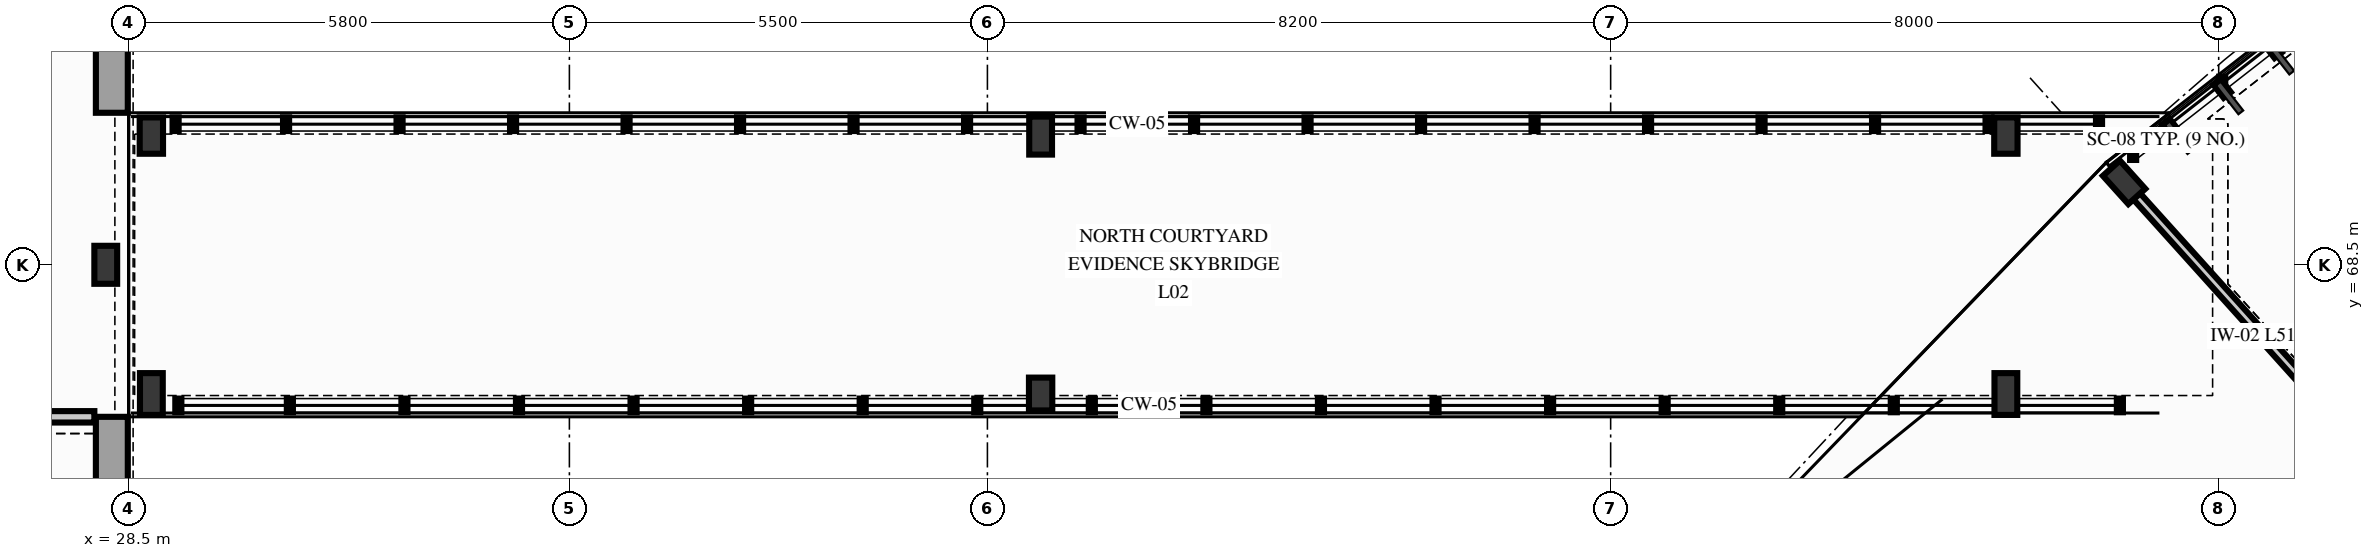
"""IFC4 building model, lengths in metres.
Left out: names, types, materials, properties, quantities, classifications, styles, units other than length and angle.
Written with IfcOpenShell. Run it as: python <this file> out.ifc"""

import sys

from ifc_helpers import new_model, si_unit, direction, frame, frame_2d, origin, origin_2d, place, context, subcontext, project, spatial, rectangle, i_section, extrude, element, save


model = new_model("IFC4")
c1 = context("Model", 3, precision=1e-05, world=origin(), true_north=direction((0.0, 1.0)))
c2 = subcontext(c1, "Body", "Model", "MODEL_VIEW")
j1 = project(units=[si_unit("LENGTHUNIT", "METRE"), si_unit("PLANEANGLEUNIT", "RADIAN")], contexts=[c1])
p1 = place(None, origin())
s1 = spatial("IfcSite", under=j1, at=p1, CompositionType="ELEMENT")
p2 = place(p1, origin())
s2 = spatial("IfcBuilding", under=s1, at=p2, CompositionType="ELEMENT")
p3 = place(p2, frame((0.0, 0.0, 9.3)))
s3 = spatial("IfcBuildingStorey", under=s2, at=p3, CompositionType="ELEMENT", Elevation=9.3)
p4 = place(p3, frame((54.756, 69.585, 0.0), z_axis=(0.0, 0.0, 1.0), x_axis=(0.743144825477, 0.669130606359, 0.0)))
e1 = element("IfcColumn", 1, at=p4, inside=s3, PredefinedType="COLUMN", context=c2, shape_type="SweptSolid", body=[
    extrude(i_section(OverallWidth=0.3, OverallDepth=0.5, WebThickness=0.014, FlangeThickness=0.028, FilletRadius=0.027, at=origin_2d()), origin(), (0.0, 0.0, 1.0), 4.2),
])
p5 = place(p3, frame((53.2, 70.2, 0.0), z_axis=(0.0, 0.0, 1.0), x_axis=(1.0, 0.0, 0.0)))
e2 = element("IfcColumn", 2, at=p5, inside=s3, PredefinedType="COLUMN", context=c2, shape_type="SweptSolid", body=[
    extrude(i_section(OverallWidth=0.307, OverallDepth=0.478, WebThickness=0.021, FlangeThickness=0.04, FilletRadius=0.027, at=origin_2d()), origin(), (0.0, 0.0, 1.0), 3.94),
])
p6 = place(p3, frame((53.2, 66.8, 0.0), z_axis=(0.0, 0.0, 1.0), x_axis=(1.0, 0.0, 0.0)))
e3 = element("IfcColumn", 3, at=p6, inside=s3, PredefinedType="COLUMN", context=c2, shape_type="SweptSolid", body=[
    extrude(i_section(OverallWidth=0.3, OverallDepth=0.55, WebThickness=0.015, FlangeThickness=0.029, FilletRadius=0.027, at=origin_2d()), origin(), (0.0, 0.0, 1.0), 3.94),
])
p7 = place(p3, frame((40.5, 70.2, 0.0), z_axis=(0.0, 0.0, 1.0), x_axis=(1.0, 0.0, 0.0)))
e4 = element("IfcColumn", 4, at=p7, inside=s3, PredefinedType="COLUMN", context=c2, shape_type="SweptSolid", body=[
    extrude(i_section(OverallWidth=0.3, OverallDepth=0.5, WebThickness=0.014, FlangeThickness=0.028, FilletRadius=0.027, at=origin_2d()), origin(), (0.0, 0.0, 1.0), 3.94),
])
p8 = place(p3, frame((40.5, 66.8, 0.0), z_axis=(0.0, 0.0, 1.0), x_axis=(1.0, 0.0, 0.0)))
e5 = element("IfcColumn", 5, at=p8, inside=s3, PredefinedType="COLUMN", context=c2, shape_type="SweptSolid", body=[
    extrude(i_section(OverallWidth=0.307, OverallDepth=0.432, WebThickness=0.021, FlangeThickness=0.04, FilletRadius=0.027, at=origin_2d()), origin(), (0.0, 0.0, 1.0), 3.94),
])
p9 = place(p3, frame((28.8, 70.2, 0.0), z_axis=(0.0, 0.0, 1.0), x_axis=(1.0, 0.0, 0.0)))
e6 = element("IfcColumn", 6, at=p9, inside=s3, PredefinedType="COLUMN", context=c2, shape_type="SweptSolid", body=[
    extrude(i_section(OverallWidth=0.307, OverallDepth=0.478, WebThickness=0.021, FlangeThickness=0.04, FilletRadius=0.027, at=origin_2d()), origin(), (0.0, 0.0, 1.0), 3.94),
])
p10 = place(p3, frame((28.8, 66.8, 0.0), z_axis=(0.0, 0.0, 1.0), x_axis=(1.0, 0.0, 0.0)))
e7 = element("IfcColumn", 7, at=p10, inside=s3, PredefinedType="COLUMN", context=c2, shape_type="SweptSolid", body=[
    extrude(i_section(OverallWidth=0.3, OverallDepth=0.55, WebThickness=0.015, FlangeThickness=0.029, FilletRadius=0.027, at=origin_2d()), origin(), (0.0, 0.0, 1.0), 3.94),
])
p11 = place(p3, frame((28.2, 68.5, 0.0), z_axis=(0.0, 0.0, 1.0), x_axis=(1.0, 0.0, 0.0)))
e8 = element("IfcColumn", 8, at=p11, inside=s3, PredefinedType="COLUMN", context=c2, shape_type="SweptSolid", body=[
    extrude(i_section(OverallWidth=0.3, OverallDepth=0.5, WebThickness=0.014, FlangeThickness=0.028, FilletRadius=0.027, at=origin_2d()), origin(), (0.0, 0.0, 1.0), 4.2),
])
p12 = place(p3, frame((28.28, 57.5, 0.0), z_axis=(0.0, 0.0, 1.0), x_axis=(0.0, 1.0, 0.0)))
e9 = element("IfcWall", 9, at=p12, inside=s3, PredefinedType="SOLIDWALL", context=c2, shape_type="SweptSolid", body=[
    extrude(rectangle(XDim=9.0, YDim=0.42, at=frame_2d((4.5, 0.0))), origin(), (0.0, 0.0, 1.0), 3.68),
])
p13 = place(p3, frame((28.28, 70.5, 0.0), z_axis=(0.0, 0.0, 1.0), x_axis=(0.0, 1.0, 0.0)))
e10 = element("IfcWall", 10, at=p13, inside=s3, PredefinedType="SOLIDWALL", context=c2, shape_type="SweptSolid", body=[
    extrude(rectangle(XDim=13.0, YDim=0.42, at=frame_2d((6.5, 0.0))), origin(), (0.0, 0.0, 1.0), 3.68),
])
p14 = place(p13, frame((5.65, 0.0, 0.74)))
e11 = element("IfcOpeningElement", 11, at=p14, cuts=e10, PredefinedType="OPENING", context=c2, shape_type="SweptSolid", body=[
    extrude(rectangle(XDim=1.8, YDim=2.4, at=frame_2d((0.9, 1.2))), frame((0.0, 0.22, 0.0), z_axis=(0.0, -1.0, 0.0), x_axis=(1.0, 0.0, 0.0)), (0.0, 0.0, 1.0), 0.44),
])
p15 = place(p3, frame((20.9, 66.5, 0.0), z_axis=(0.0, 0.0, 1.0), x_axis=(1.0, 0.0, 0.0)))
e12 = element("IfcWall", 12, at=p15, inside=s3, PredefinedType="PARTITIONING", context=c2, shape_type="SweptSolid", body=[
    extrude(rectangle(XDim=7.15, YDim=0.15, at=frame_2d((3.575, 0.0))), origin(), (0.0, 0.0, 1.0), 3.92),
])
p16 = place(p3, frame((58.302, 65.647, 0.0), z_axis=(0.0, 0.0, 1.0), x_axis=(-0.669114002905, 0.743159774959, 0.0)))
e13 = element("IfcWall", 13, at=p16, inside=s3, PredefinedType="PARTITIONING", context=c2, shape_type="SweptSolid", body=[
    extrude(rectangle(XDim=5.15, YDim=0.12, at=frame_2d((2.575, 0.0))), origin(), (0.0, 0.0, 1.0), 3.55),
])
save(model, sys.argv[1])
